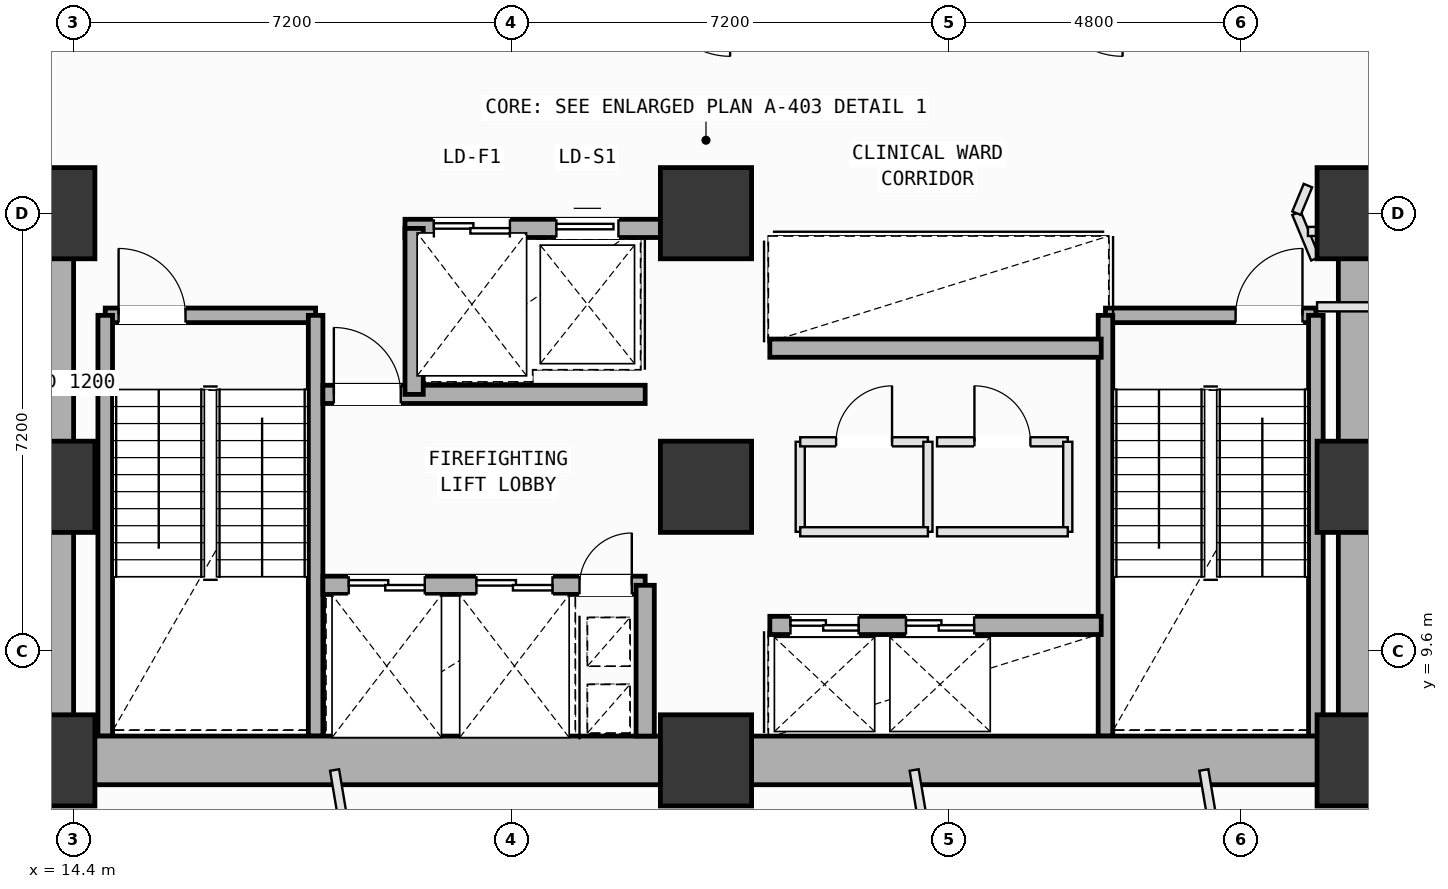
"""IFC4 building model, lengths in metres.
Left out: names, types, materials, properties, quantities, classifications, styles, units other than length and angle.
Written with IfcOpenShell. Run it as: python <this file> out.ifc"""

import sys

from ifc_helpers import new_model, si_unit, direction, frame, frame_2d, origin, origin_2d, place, context, subcontext, project, spatial, rectangle, extrude, element, fill, save


model = new_model("IFC4")
c1 = context("Model", 3, precision=1e-05, world=origin(), true_north=direction((0.0, 1.0)))
c2 = subcontext(c1, "Body", "Model", "MODEL_VIEW")
j1 = project(units=[si_unit("LENGTHUNIT", "METRE"), si_unit("PLANEANGLEUNIT", "RADIAN")], contexts=[c1])
p1 = place(None, origin())
s1 = spatial("IfcSite", under=j1, at=p1, CompositionType="ELEMENT")
p2 = place(p1, origin())
s2 = spatial("IfcBuilding", under=s1, at=p2, CompositionType="ELEMENT")
p3 = place(p2, frame((0.0, 0.0, 63.0)))
s3 = spatial("IfcBuildingStorey", under=s2, at=p3, CompositionType="ELEMENT", Elevation=63.0)
for number, where, z_axis, x_axis in (
    (1, (14.0, 7.8, 0.0), (0.0, 0.0, 1.0), (1.0, 0.0, 0.0)),
    (2, (14.0, 12.3, 0.0), (0.0, 0.0, 1.0), (1.0, 0.0, 0.0)),
    (3, (14.0, 16.8, 0.0), (0.0, 0.0, 1.0), (1.0, 0.0, 0.0)),
    (4, (24.8, 7.8, 0.0), (0.0, 0.0, 1.0), (1.0, 0.0, 0.0)),
    (5, (24.8, 12.3, 0.0), (0.0, 0.0, 1.0), (1.0, 0.0, 0.0)),
    (6, (24.8, 16.8, 0.0), (0.0, 0.0, 1.0), (1.0, 0.0, 0.0)),
    (7, (35.6, 7.8, 0.0), (0.0, 0.0, 1.0), (1.0, 0.0, 0.0)),
    (8, (35.6, 12.3, 0.0), (0.0, 0.0, 1.0), (1.0, 0.0, 0.0)),
    (9, (35.6, 16.8, 0.0), (0.0, 0.0, 1.0), (1.0, 0.0, 0.0)),
):
    element("IfcColumn", number, at=place(p3, frame(where, z_axis=z_axis, x_axis=x_axis)), inside=s3, PredefinedType="COLUMN", context=c2, shape_type="SweptSolid", body=[
        extrude(rectangle(XDim=1.5, YDim=1.5, at=origin_2d()), origin(), (0.0, 0.0, 1.0), 4.0),
    ])
p4 = place(p3, frame((14.92, 15.12, 0.0), z_axis=(0.0, 0.0, 1.0), x_axis=(1.0, 0.0, 0.0)))
e10 = element("IfcWall", 10, at=p4, inside=s3, PredefinedType="SOLIDWALL", context=c2, shape_type="SweptSolid", body=[
    extrude(rectangle(XDim=3.46, YDim=0.24, at=frame_2d((1.73, 0.0))), origin(), (0.0, 0.0, 1.0), 3.78),
])
p5 = place(p4, frame((0.22, 0.0, 0.0)))
e11 = element("IfcOpeningElement", 11, at=p5, cuts=e10, PredefinedType="OPENING", context=c2, shape_type="SweptSolid", body=[
    extrude(rectangle(XDim=1.1, YDim=2.15, at=frame_2d((0.55, 1.075))), frame((0.0, 0.13, 0.0), z_axis=(0.0, -1.0, 0.0), x_axis=(1.0, 0.0, 0.0)), (0.0, 0.0, 1.0), 0.26),
])
for number, where, z_axis, x_axis in (
    (12, (18.38, 15.12, 0.0), (0.0, 0.0, 1.0), (0.0, -1.0, 0.0)),
    (13, (14.92, 8.2, 0.0), (0.0, 0.0, 1.0), (0.0, 1.0, 0.0)),
):
    element("IfcWall", number, at=place(p3, frame(where, z_axis=z_axis, x_axis=x_axis)), inside=s3, PredefinedType="SOLIDWALL", context=c2, shape_type="SweptSolid", body=[
        extrude(rectangle(XDim=6.92, YDim=0.24, at=frame_2d((3.46, 0.0))), origin(), (0.0, 0.0, 1.0), 3.78),
    ])
p6 = place(p3, frame((31.37, 15.12, 0.0), z_axis=(0.0, 0.0, 1.0), x_axis=(1.0, 0.0, 0.0)))
e14 = element("IfcWall", 14, at=p6, inside=s3, PredefinedType="SOLIDWALL", context=c2, shape_type="SweptSolid", body=[
    extrude(rectangle(XDim=3.46, YDim=0.24, at=frame_2d((1.73, 0.0))), origin(), (0.0, 0.0, 1.0), 3.78),
])
p7 = place(p6, frame((2.14, 0.0, 0.0)))
e15 = element("IfcOpeningElement", 15, at=p7, cuts=e14, PredefinedType="OPENING", context=c2, shape_type="SweptSolid", body=[
    extrude(rectangle(XDim=1.1, YDim=2.15, at=frame_2d((0.55, 1.075))), frame((0.0, 0.13, 0.0), z_axis=(0.0, -1.0, 0.0), x_axis=(1.0, 0.0, 0.0)), (0.0, 0.0, 1.0), 0.26),
])
for number, where, z_axis, x_axis in (
    (16, (34.83, 15.12, 0.0), (0.0, 0.0, 1.0), (0.0, -1.0, 0.0)),
    (17, (31.37, 8.2, 0.0), (0.0, 0.0, 1.0), (0.0, 1.0, 0.0)),
):
    element("IfcWall", number, at=place(p3, frame(where, z_axis=z_axis, x_axis=x_axis)), inside=s3, PredefinedType="SOLIDWALL", context=c2, shape_type="SweptSolid", body=[
        extrude(rectangle(XDim=6.92, YDim=0.24, at=frame_2d((3.46, 0.0))), origin(), (0.0, 0.0, 1.0), 3.78),
    ])
for number, where, z_axis, x_axis in (
    (18, (14.0, 7.8, 0.0), (0.0, 0.0, 1.0), (1.0, 0.0, 0.0)),
    (19, (24.8, 7.8, 0.0), (0.0, 0.0, 1.0), (1.0, 0.0, 0.0)),
):
    element("IfcWall", number, at=place(p3, frame(where, z_axis=z_axis, x_axis=x_axis)), inside=s3, PredefinedType="SHEAR", context=c2, shape_type="SweptSolid", body=[
        extrude(rectangle(XDim=10.8, YDim=0.8, at=frame_2d((5.4, 0.0))), origin(), (0.0, 0.0, 1.0), 3.78),
    ])
for number, where, z_axis, x_axis in (
    (20, (35.6, 7.8, 0.0), (0.0, 0.0, 1.0), (0.0, 1.0, 0.0)),
    (21, (14.0, 16.8, 0.0), (0.0, 0.0, 1.0), (0.0, -1.0, 0.0)),
):
    element("IfcWall", number, at=place(p3, frame(where, z_axis=z_axis, x_axis=x_axis)), inside=s3, PredefinedType="SHEAR", context=c2, shape_type="SweptSolid", body=[
        extrude(rectangle(XDim=9.0, YDim=0.8, at=frame_2d((4.5, 0.0))), origin(), (0.0, 0.0, 1.0), 3.78),
    ])
p8 = place(p3, frame((19.85, 16.55, 0.0), z_axis=(0.0, 0.0, 1.0), x_axis=(1.0, 0.0, 0.0)))
e22 = element("IfcWall", 22, at=p8, inside=s3, PredefinedType="SOLIDWALL", context=c2, shape_type="SweptSolid", body=[
    extrude(rectangle(XDim=4.2, YDim=0.3, at=frame_2d((2.1, 0.0))), origin(), (0.0, 0.0, 1.0), 3.78),
])
p9 = place(p8, frame((0.475, 0.0, 0.0)))
e23 = element("IfcOpeningElement", 23, at=p9, cuts=e22, PredefinedType="OPENING", context=c2, shape_type="SweptSolid", body=[
    extrude(rectangle(XDim=1.25, YDim=2.18, at=frame_2d((0.625, 1.09))), frame((0.0, 0.16, 0.0), z_axis=(0.0, -1.0, 0.0), x_axis=(1.0, 0.0, 0.0)), (0.0, 0.0, 1.0), 0.32),
])
p10 = place(p8, frame((2.49, 0.0, 0.0)))
e24 = element("IfcOpeningElement", 24, at=p10, cuts=e22, PredefinedType="OPENING", context=c2, shape_type="SweptSolid", body=[
    extrude(rectangle(XDim=1.02, YDim=2.12, at=frame_2d((0.51, 1.06))), frame((0.0, 0.16, 0.0), z_axis=(0.0, -1.0, 0.0), x_axis=(1.0, 0.0, 0.0)), (0.0, 0.0, 1.0), 0.32),
])
p11 = place(p3, frame((18.5, 10.68, 0.0), z_axis=(0.0, 0.0, 1.0), x_axis=(1.0, 0.0, 0.0)))
e25 = element("IfcWall", 25, at=p11, inside=s3, PredefinedType="SOLIDWALL", context=c2, shape_type="SweptSolid", body=[
    extrude(rectangle(XDim=5.3, YDim=0.3, at=frame_2d((2.65, 0.0))), origin(), (0.0, 0.0, 1.0), 3.78),
])
p12 = place(p11, frame((4.22, 0.0, 0.0)))
e26 = element("IfcOpeningElement", 26, at=p12, cuts=e25, PredefinedType="OPENING", context=c2, shape_type="SweptSolid", body=[
    extrude(rectangle(XDim=0.86, YDim=2.06, at=frame_2d((0.43, 1.03))), frame((0.0, 0.16, 0.0), z_axis=(0.0, -1.0, 0.0), x_axis=(1.0, 0.0, 0.0)), (0.0, 0.0, 1.0), 0.32),
])
p13 = place(p11, frame((0.425, 0.0, 0.0)))
e27 = element("IfcOpeningElement", 27, at=p13, cuts=e25, PredefinedType="OPENING", context=c2, shape_type="SweptSolid", body=[
    extrude(rectangle(XDim=1.25, YDim=2.18, at=frame_2d((0.625, 1.09))), frame((0.0, 0.16, 0.0), z_axis=(0.0, -1.0, 0.0), x_axis=(1.0, 0.0, 0.0)), (0.0, 0.0, 1.0), 0.32),
])
p14 = place(p11, frame((2.525, 0.0, 0.0)))
e28 = element("IfcOpeningElement", 28, at=p14, cuts=e25, PredefinedType="OPENING", context=c2, shape_type="SweptSolid", body=[
    extrude(rectangle(XDim=1.25, YDim=2.18, at=frame_2d((0.625, 1.09))), frame((0.0, 0.16, 0.0), z_axis=(0.0, -1.0, 0.0), x_axis=(1.0, 0.0, 0.0)), (0.0, 0.0, 1.0), 0.32),
])
p15 = place(p3, frame((18.5, 13.82, 0.0), z_axis=(0.0, 0.0, 1.0), x_axis=(1.0, 0.0, 0.0)))
e29 = element("IfcWall", 29, at=p15, inside=s3, PredefinedType="SOLIDWALL", context=c2, shape_type="SweptSolid", body=[
    extrude(rectangle(XDim=5.3, YDim=0.3, at=frame_2d((2.65, 0.0))), origin(), (0.0, 0.0, 1.0), 3.78),
])
p16 = place(p15, frame((0.18, 0.0, 0.0)))
e30 = element("IfcOpeningElement", 30, at=p16, cuts=e29, PredefinedType="OPENING", context=c2, shape_type="SweptSolid", body=[
    extrude(rectangle(XDim=1.1, YDim=2.15, at=frame_2d((0.55, 1.075))), frame((0.0, 0.16, 0.0), z_axis=(0.0, -1.0, 0.0), x_axis=(1.0, 0.0, 0.0)), (0.0, 0.0, 1.0), 0.32),
])
p17 = place(p3, frame((23.8, 8.2, 0.0), z_axis=(0.0, 0.0, 1.0), x_axis=(0.0, 1.0, 0.0)))
e31 = element("IfcWall", 31, at=p17, inside=s3, PredefinedType="SOLIDWALL", context=c2, shape_type="SweptSolid", body=[
    extrude(rectangle(XDim=2.48, YDim=0.3, at=frame_2d((1.24, 0.0))), origin(), (0.0, 0.0, 1.0), 3.78),
])
p18 = place(p3, frame((20.0, 13.82, 0.0), z_axis=(0.0, 0.0, 1.0), x_axis=(0.0, 1.0, 0.0)))
e32 = element("IfcWall", 32, at=p18, inside=s3, PredefinedType="SOLIDWALL", context=c2, shape_type="SweptSolid", body=[
    extrude(rectangle(XDim=2.73, YDim=0.3, at=frame_2d((1.365, 0.0))), origin(), (0.0, 0.0, 1.0), 3.78),
])
p19 = place(p3, frame((25.85, 10.02, 0.0), z_axis=(0.0, 0.0, 1.0), x_axis=(1.0, 0.0, 0.0)))
e33 = element("IfcWall", 33, at=p19, inside=s3, PredefinedType="SOLIDWALL", context=c2, shape_type="SweptSolid", body=[
    extrude(rectangle(XDim=5.45, YDim=0.3, at=frame_2d((2.725, 0.0))), origin(), (0.0, 0.0, 1.0), 3.78),
])
p20 = place(p19, frame((0.34, 0.0, 0.0)))
e34 = element("IfcOpeningElement", 34, at=p20, cuts=e33, PredefinedType="OPENING", context=c2, shape_type="SweptSolid", body=[
    extrude(rectangle(XDim=1.12, YDim=2.15, at=frame_2d((0.56, 1.075))), frame((0.0, 0.16, 0.0), z_axis=(0.0, -1.0, 0.0), x_axis=(1.0, 0.0, 0.0)), (0.0, 0.0, 1.0), 0.32),
])
p21 = place(p19, frame((2.24, 0.0, 0.0)))
e35 = element("IfcOpeningElement", 35, at=p21, cuts=e33, PredefinedType="OPENING", context=c2, shape_type="SweptSolid", body=[
    extrude(rectangle(XDim=1.12, YDim=2.15, at=frame_2d((0.56, 1.075))), frame((0.0, 0.16, 0.0), z_axis=(0.0, -1.0, 0.0), x_axis=(1.0, 0.0, 0.0)), (0.0, 0.0, 1.0), 0.32),
])
p22 = place(p3, frame((25.85, 14.58, 0.0), z_axis=(0.0, 0.0, 1.0), x_axis=(1.0, 0.0, 0.0)))
e36 = element("IfcWall", 36, at=p22, inside=s3, PredefinedType="SOLIDWALL", context=c2, shape_type="SweptSolid", body=[
    extrude(rectangle(XDim=5.45, YDim=0.3, at=frame_2d((2.725, 0.0))), origin(), (0.0, 0.0, 1.0), 3.78),
])
p23 = place(p3, frame((26.35, 11.56, 0.0), z_axis=(0.0, 0.0, 1.0), x_axis=(0.0, 1.0, 0.0)))
e37 = element("IfcWall", 37, at=p23, inside=s3, PredefinedType="PARTITIONING", context=c2, shape_type="SweptSolid", body=[
    extrude(rectangle(XDim=1.48, YDim=0.15, at=frame_2d((0.74, 0.0))), origin(), (0.0, 0.0, 1.0), 3.78),
])
p24 = place(p3, frame((26.35, 13.04, 0.0), z_axis=(0.0, 0.0, 1.0), x_axis=(1.0, 0.0, 0.0)))
e38 = element("IfcWall", 38, at=p24, inside=s3, PredefinedType="PARTITIONING", context=c2, shape_type="SweptSolid", body=[
    extrude(rectangle(XDim=2.1, YDim=0.15, at=frame_2d((1.05, 0.0))), origin(), (0.0, 0.0, 1.0), 3.78),
])
p25 = place(p24, frame((0.59, 0.0, 0.0)))
e39 = element("IfcOpeningElement", 39, at=p25, cuts=e38, PredefinedType="OPENING", context=c2, shape_type="SweptSolid", body=[
    extrude(rectangle(XDim=0.92, YDim=2.1, at=frame_2d((0.46, 1.05))), frame((0.0, 0.085, 0.0), z_axis=(0.0, -1.0, 0.0), x_axis=(1.0, 0.0, 0.0)), (0.0, 0.0, 1.0), 0.17),
])
p26 = place(p3, frame((28.45, 13.04, 0.0), z_axis=(0.0, 0.0, 1.0), x_axis=(0.0, -1.0, 0.0)))
e40 = element("IfcWall", 40, at=p26, inside=s3, PredefinedType="PARTITIONING", context=c2, shape_type="SweptSolid", body=[
    extrude(rectangle(XDim=1.48, YDim=0.15, at=frame_2d((0.74, 0.0))), origin(), (0.0, 0.0, 1.0), 3.78),
])
p27 = place(p3, frame((28.45, 11.56, 0.0), z_axis=(0.0, 0.0, 1.0), x_axis=(-1.0, 0.0, 0.0)))
e41 = element("IfcWall", 41, at=p27, inside=s3, PredefinedType="PARTITIONING", context=c2, shape_type="SweptSolid", body=[
    extrude(rectangle(XDim=2.1, YDim=0.15, at=frame_2d((1.05, 0.0))), origin(), (0.0, 0.0, 1.0), 3.78),
])
p28 = place(p3, frame((28.6, 13.04, 0.0), z_axis=(0.0, 0.0, 1.0), x_axis=(1.0, 0.0, 0.0)))
e42 = element("IfcWall", 42, at=p28, inside=s3, PredefinedType="PARTITIONING", context=c2, shape_type="SweptSolid", body=[
    extrude(rectangle(XDim=2.15, YDim=0.15, at=frame_2d((1.075, 0.0))), origin(), (0.0, 0.0, 1.0), 3.78),
])
p29 = place(p28, frame((0.615, 0.0, 0.0)))
e43 = element("IfcOpeningElement", 43, at=p29, cuts=e42, PredefinedType="OPENING", context=c2, shape_type="SweptSolid", body=[
    extrude(rectangle(XDim=0.92, YDim=2.1, at=frame_2d((0.46, 1.05))), frame((0.0, 0.085, 0.0), z_axis=(0.0, -1.0, 0.0), x_axis=(1.0, 0.0, 0.0)), (0.0, 0.0, 1.0), 0.17),
])
p30 = place(p3, frame((30.75, 13.04, 0.0), z_axis=(0.0, 0.0, 1.0), x_axis=(0.0, -1.0, 0.0)))
e44 = element("IfcWall", 44, at=p30, inside=s3, PredefinedType="PARTITIONING", context=c2, shape_type="SweptSolid", body=[
    extrude(rectangle(XDim=1.48, YDim=0.15, at=frame_2d((0.74, 0.0))), origin(), (0.0, 0.0, 1.0), 3.78),
])
p31 = place(p3, frame((30.75, 11.56, 0.0), z_axis=(0.0, 0.0, 1.0), x_axis=(-1.0, 0.0, 0.0)))
e45 = element("IfcWall", 45, at=p31, inside=s3, PredefinedType="PARTITIONING", context=c2, shape_type="SweptSolid", body=[
    extrude(rectangle(XDim=2.15, YDim=0.15, at=frame_2d((1.075, 0.0))), origin(), (0.0, 0.0, 1.0), 3.78),
])
p32 = place(p3, frame((18.692, 7.642, 0.0), z_axis=(0.0, 0.0, 1.0), x_axis=(0.165126417203, -0.986272409805, 0.0)))
e46 = element("IfcWall", 46, at=p32, inside=s3, PredefinedType="PARTITIONING", context=c2, shape_type="SweptSolid", body=[
    extrude(rectangle(XDim=7.673, YDim=0.15, at=frame_2d((3.837, 0.0))), origin(), (0.0, 0.0, 1.0), 3.78),
])
p33 = place(p3, frame((28.224, 7.642, 0.0), z_axis=(0.0, 0.0, 1.0), x_axis=(0.164972035395, -0.98629824472, 0.0)))
e47 = element("IfcWall", 47, at=p33, inside=s3, PredefinedType="PARTITIONING", context=c2, shape_type="SweptSolid", body=[
    extrude(rectangle(XDim=6.079, YDim=0.15, at=frame_2d((3.04, 0.0))), origin(), (0.0, 0.0, 1.0), 3.78),
])
p34 = place(p33, frame((2.8, 0.0, 0.0)))
e48 = element("IfcOpeningElement", 48, at=p34, cuts=e47, PredefinedType="OPENING", context=c2, shape_type="SweptSolid", body=[
    extrude(rectangle(XDim=0.86, YDim=2.06, at=frame_2d((0.43, 1.03))), frame((0.0, 0.085, 0.0), z_axis=(0.0, -1.0, 0.0), x_axis=(1.0, 0.0, 0.0)), (0.0, 0.0, 1.0), 0.17),
])
p35 = place(p3, frame((32.988, 7.642, 0.0), z_axis=(0.0, 0.0, 1.0), x_axis=(0.165101931281, -0.986276509042, 0.0)))
e49 = element("IfcWall", 49, at=p35, inside=s3, PredefinedType="PARTITIONING", context=c2, shape_type="SweptSolid", body=[
    extrude(rectangle(XDim=5.294, YDim=0.15, at=frame_2d((2.647, 0.0))), origin(), (0.0, 0.0, 1.0), 3.78),
])
p36 = place(p35, frame((2.369, 0.0, 0.0)))
e50 = element("IfcOpeningElement", 50, at=p36, cuts=e49, PredefinedType="OPENING", context=c2, shape_type="SweptSolid", body=[
    extrude(rectangle(XDim=0.86, YDim=2.06, at=frame_2d((0.43, 1.03))), frame((0.0, 0.085, 0.0), z_axis=(0.0, -1.0, 0.0), x_axis=(1.0, 0.0, 0.0)), (0.0, 0.0, 1.0), 0.17),
])
p37 = place(p3, frame((36.15, 15.26, 0.0), z_axis=(0.0, 0.0, 1.0), x_axis=(-1.0, 0.0, 0.0)))
e51 = element("IfcWall", 51, at=p37, inside=s3, PredefinedType="PARTITIONING", context=c2, shape_type="SweptSolid", body=[
    extrude(rectangle(XDim=1.3, YDim=0.15, at=frame_2d((0.65, 0.0))), origin(), (0.0, 0.0, 1.0), 3.78),
])
p38 = place(p3, frame((34.822, 16.05, 0.0), z_axis=(0.0, 0.0, 1.0), x_axis=(-0.382050639738, 0.924141389981, 0.0)))
e52 = element("IfcWall", 52, at=p38, inside=s3, PredefinedType="PARTITIONING", context=c2, shape_type="SweptSolid", body=[
    extrude(rectangle(XDim=0.812, YDim=0.15, at=frame_2d((0.406, 0.0))), origin(), (0.0, 0.0, 1.0), 3.78),
])
p39 = place(p3, frame((34.512, 16.8, 0.0), z_axis=(0.0, 0.0, 1.0), x_axis=(0.382673670509, 0.923883575944, 0.0)))
e53 = element("IfcWall", 53, at=p39, inside=s3, PredefinedType="PARTITIONING", context=c2, shape_type="SweptSolid", body=[
    extrude(rectangle(XDim=0.491, YDim=0.15, at=frame_2d((0.246, 0.0))), origin(), (0.0, 0.0, 1.0), 3.78),
])
p40 = place(p3, frame((34.7, 16.5, 0.0), z_axis=(0.0, 0.0, 1.0), x_axis=(1.0, 0.0, 0.0)))
e54 = element("IfcWall", 54, at=p40, inside=s3, PredefinedType="PARTITIONING", context=c2, shape_type="SweptSolid", body=[
    extrude(rectangle(XDim=1.572, YDim=0.15, at=frame_2d((0.786, 0.0))), origin(), (0.0, 0.0, 1.0), 2.865),
])
p41 = place(p3, frame((35.6, 7.5, 0.0), z_axis=(0.0, 0.0, 1.0), x_axis=(1.0, 0.0, 0.0)))
e55 = element("IfcWall", 55, at=p41, inside=s3, PredefinedType="PARTITIONING", context=c2, shape_type="SweptSolid", body=[
    extrude(rectangle(XDim=0.55, YDim=0.15, at=frame_2d((0.275, 0.0))), origin(), (0.0, 0.0, 1.0), 3.78),
])
p42 = place(p5, origin())
e56 = element("IfcDoor", 56, at=p42, inside=s3, OperationType="SINGLE_SWING_LEFT", PredefinedType="DOOR", context=c2, shape_type="SweptSolid", body=[
    extrude(rectangle(XDim=1.1, YDim=2.15, at=frame_2d((0.55, 1.075))), frame((0.0, 0.025, 0.0), z_axis=(0.0, -1.0, 0.0), x_axis=(1.0, 0.0, 0.0)), (0.0, 0.0, 1.0), 0.05),
])
fill(e11, e56)
p43 = place(p7, origin())
e57 = element("IfcDoor", 57, at=p43, inside=s3, OperationType="SINGLE_SWING_RIGHT", PredefinedType="DOOR", context=c2, shape_type="SweptSolid", body=[
    extrude(rectangle(XDim=1.1, YDim=2.15, at=frame_2d((0.55, 1.075))), frame((0.0, 0.025, 0.0), z_axis=(0.0, -1.0, 0.0), x_axis=(1.0, 0.0, 0.0)), (0.0, 0.0, 1.0), 0.05),
])
fill(e15, e57)
p44 = place(p12, origin())
e58 = element("IfcDoor", 58, at=p44, inside=s3, OperationType="SINGLE_SWING_RIGHT", PredefinedType="DOOR", context=c2, shape_type="SweptSolid", body=[
    extrude(rectangle(XDim=0.86, YDim=2.06, at=frame_2d((0.43, 1.03))), frame((0.0, 0.025, 0.0), z_axis=(0.0, -1.0, 0.0), x_axis=(1.0, 0.0, 0.0)), (0.0, 0.0, 1.0), 0.05),
])
fill(e26, e58)
p45 = place(p16, origin())
e59 = element("IfcDoor", 59, at=p45, inside=s3, OperationType="SINGLE_SWING_LEFT", PredefinedType="DOOR", context=c2, shape_type="SweptSolid", body=[
    extrude(rectangle(XDim=1.1, YDim=2.15, at=frame_2d((0.55, 1.075))), frame((0.0, 0.025, 0.0), z_axis=(0.0, -1.0, 0.0), x_axis=(1.0, 0.0, 0.0)), (0.0, 0.0, 1.0), 0.05),
])
fill(e30, e59)
p46 = place(p13, origin())
e60 = element("IfcDoor", 60, at=p46, inside=s3, OperationType="DOUBLE_DOOR_SLIDING", PredefinedType="DOOR", context=c2, shape_type="SweptSolid", body=[
    extrude(rectangle(XDim=1.25, YDim=2.18, at=frame_2d((0.625, 1.09))), frame((0.0, 0.025, 0.0), z_axis=(0.0, -1.0, 0.0), x_axis=(1.0, 0.0, 0.0)), (0.0, 0.0, 1.0), 0.05),
])
fill(e27, e60)
p47 = place(p14, origin())
e61 = element("IfcDoor", 61, at=p47, inside=s3, OperationType="DOUBLE_DOOR_SLIDING", PredefinedType="DOOR", context=c2, shape_type="SweptSolid", body=[
    extrude(rectangle(XDim=1.25, YDim=2.18, at=frame_2d((0.625, 1.09))), frame((0.0, 0.025, 0.0), z_axis=(0.0, -1.0, 0.0), x_axis=(1.0, 0.0, 0.0)), (0.0, 0.0, 1.0), 0.05),
])
fill(e28, e61)
p48 = place(p20, origin())
e62 = element("IfcDoor", 62, at=p48, inside=s3, OperationType="DOUBLE_DOOR_SLIDING", PredefinedType="DOOR", context=c2, shape_type="SweptSolid", body=[
    extrude(rectangle(XDim=1.12, YDim=2.15, at=frame_2d((0.56, 1.075))), frame((0.0, 0.025, 0.0), z_axis=(0.0, -1.0, 0.0), x_axis=(1.0, 0.0, 0.0)), (0.0, 0.0, 1.0), 0.05),
])
fill(e34, e62)
p49 = place(p21, origin())
e63 = element("IfcDoor", 63, at=p49, inside=s3, OperationType="DOUBLE_DOOR_SLIDING", PredefinedType="DOOR", context=c2, shape_type="SweptSolid", body=[
    extrude(rectangle(XDim=1.12, YDim=2.15, at=frame_2d((0.56, 1.075))), frame((0.0, 0.025, 0.0), z_axis=(0.0, -1.0, 0.0), x_axis=(1.0, 0.0, 0.0)), (0.0, 0.0, 1.0), 0.05),
])
fill(e35, e63)
p50 = place(p9, origin())
e64 = element("IfcDoor", 64, at=p50, inside=s3, OperationType="DOUBLE_DOOR_SLIDING", PredefinedType="DOOR", context=c2, shape_type="SweptSolid", body=[
    extrude(rectangle(XDim=1.25, YDim=2.18, at=frame_2d((0.625, 1.09))), frame((0.0, 0.025, 0.0), z_axis=(0.0, -1.0, 0.0), x_axis=(1.0, 0.0, 0.0)), (0.0, 0.0, 1.0), 0.05),
])
fill(e23, e64)
p51 = place(p10, origin())
e65 = element("IfcDoor", 65, at=p51, inside=s3, OperationType="SLIDING_TO_LEFT", PredefinedType="DOOR", context=c2, shape_type="SweptSolid", body=[
    extrude(rectangle(XDim=1.02, YDim=2.12, at=frame_2d((0.51, 1.06))), frame((0.0, 0.025, 0.0), z_axis=(0.0, -1.0, 0.0), x_axis=(1.0, 0.0, 0.0)), (0.0, 0.0, 1.0), 0.05),
])
fill(e24, e65)
p52 = place(p25, origin())
e66 = element("IfcDoor", 66, at=p52, inside=s3, OperationType="SINGLE_SWING_RIGHT", PredefinedType="DOOR", context=c2, shape_type="SweptSolid", body=[
    extrude(rectangle(XDim=0.92, YDim=2.1, at=frame_2d((0.46, 1.05))), frame((0.0, 0.025, 0.0), z_axis=(0.0, -1.0, 0.0), x_axis=(1.0, 0.0, 0.0)), (0.0, 0.0, 1.0), 0.05),
])
fill(e39, e66)
p53 = place(p29, origin())
e67 = element("IfcDoor", 67, at=p53, inside=s3, OperationType="SINGLE_SWING_LEFT", PredefinedType="DOOR", context=c2, shape_type="SweptSolid", body=[
    extrude(rectangle(XDim=0.92, YDim=2.1, at=frame_2d((0.46, 1.05))), frame((0.0, 0.025, 0.0), z_axis=(0.0, -1.0, 0.0), x_axis=(1.0, 0.0, 0.0)), (0.0, 0.0, 1.0), 0.05),
])
fill(e43, e67)
save(model, sys.argv[1])
